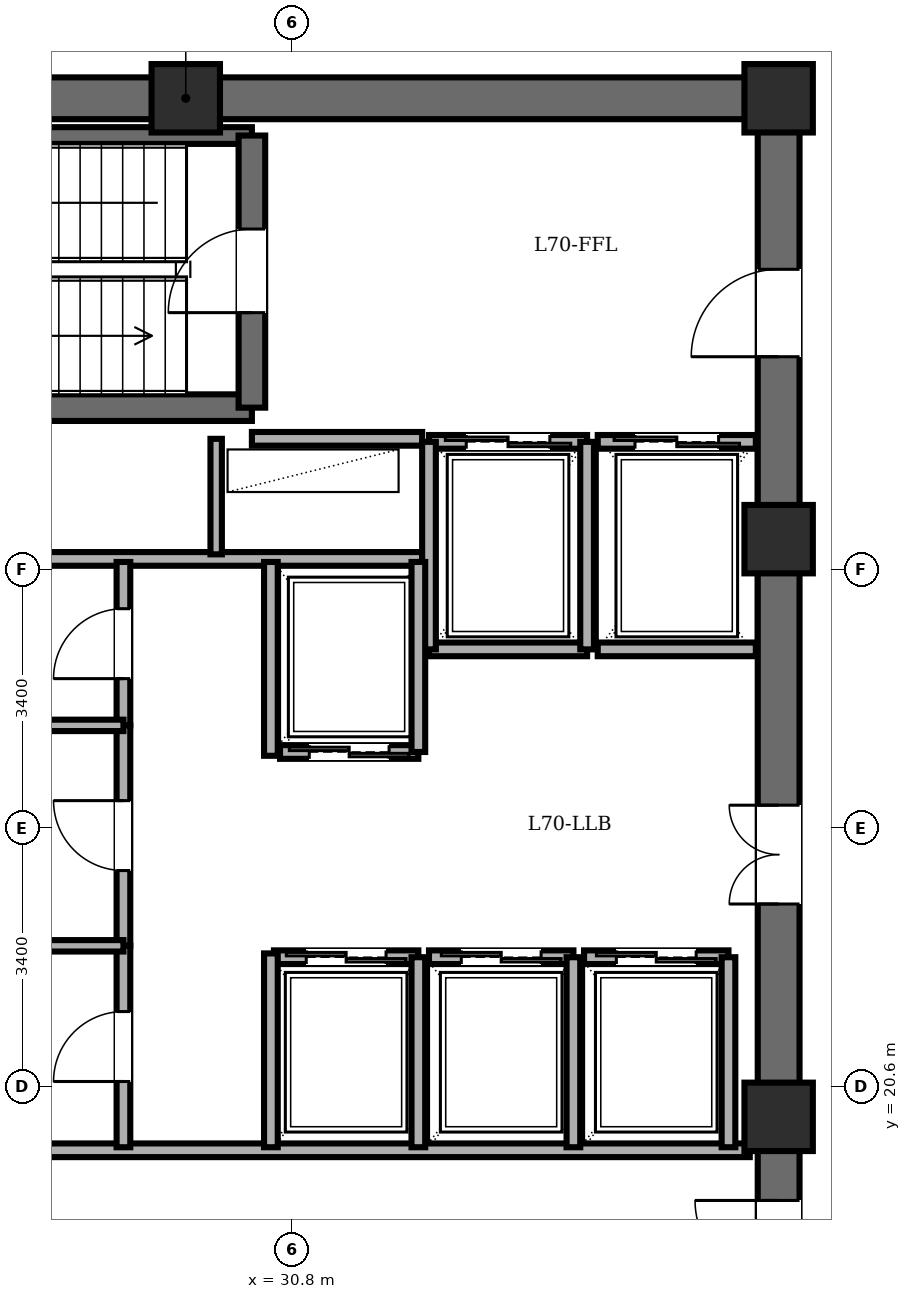
"""IFC4 building model, lengths in metres.
Left out: names, types, materials, properties, quantities, classifications, styles, units other than length and angle.
Written with IfcOpenShell. Run it as: python <this file> out.ifc"""

import sys

from ifc_helpers import new_model, si_unit, direction, frame, frame_2d, origin, origin_2d, place, context, subcontext, project, spatial, rectangle, extrude, element, fill, save


model = new_model("IFC4")
c1 = context("Model", 3, precision=1e-05, world=origin(), true_north=direction((0.0, 1.0)))
c2 = subcontext(c1, "Body", "Model", "MODEL_VIEW")
j1 = project(units=[si_unit("LENGTHUNIT", "METRE"), si_unit("PLANEANGLEUNIT", "RADIAN")], contexts=[c1])
p1 = place(None, origin())
s1 = spatial("IfcSite", under=j1, at=p1, CompositionType="ELEMENT")
p2 = place(p1, origin())
s2 = spatial("IfcBuilding", under=s1, at=p2, CompositionType="ELEMENT")
p3 = place(p2, frame((0.0, 0.0, 269.75)))
s3 = spatial("IfcBuildingStorey", under=s2, at=p3, CompositionType="ELEMENT", Elevation=269.75)
for number, where, z_axis, x_axis in (
    (1, (37.2, 20.2, 0.0), (0.0, 0.0, 1.0), (1.0, 0.0, 0.0)),
    (2, (37.2, 27.8, 0.0), (0.0, 0.0, 1.0), (1.0, 0.0, 0.0)),
    (3, (37.2, 33.6, 0.0), (0.0, 0.0, 1.0), (1.0, 0.0, 0.0)),
    (4, (29.4, 33.6, 0.0), (0.0, 0.0, 1.0), (1.0, 0.0, 0.0)),
):
    element("IfcColumn", number, at=place(p3, frame(where, z_axis=z_axis, x_axis=x_axis)), inside=s3, PredefinedType="COLUMN", context=c2, shape_type="SweptSolid", body=[
        extrude(rectangle(XDim=0.9, YDim=0.9, at=origin_2d()), origin(), (0.0, 0.0, 1.0), 3.65),
    ])
p4 = place(p3, frame((21.6, 33.6, 0.0), z_axis=(0.0, 0.0, 1.0), x_axis=(1.0, 0.0, 0.0)))
e5 = element("IfcWall", 5, at=p4, inside=s3, PredefinedType="SHEAR", context=c2, shape_type="SweptSolid", body=[
    extrude(rectangle(XDim=15.6, YDim=0.55, at=frame_2d((7.8, 0.0))), origin(), (0.0, 0.0, 1.0), 3.45),
])
p5 = place(p3, frame((37.2, 14.4, 0.0), z_axis=(0.0, 0.0, 1.0), x_axis=(0.0, 1.0, 0.0)))
e6 = element("IfcWall", 6, at=p5, inside=s3, PredefinedType="SHEAR", context=c2, shape_type="SweptSolid", body=[
    extrude(rectangle(XDim=19.2, YDim=0.55, at=frame_2d((9.6, 0.0))), origin(), (0.0, 0.0, 1.0), 3.45),
])
p6 = place(p5, frame((15.8, 0.0, 0.0)))
e7 = element("IfcOpeningElement", 7, at=p6, cuts=e6, PredefinedType="OPENING", context=c2, shape_type="SweptSolid", body=[
    extrude(rectangle(XDim=1.15, YDim=2.15, at=frame_2d((0.575, 1.075))), frame((0.0, 0.285, 0.0), z_axis=(0.0, -1.0, 0.0), x_axis=(1.0, 0.0, 0.0)), (0.0, 0.0, 1.0), 0.57),
])
p7 = place(p5, frame((3.6, 0.0, 0.0)))
e8 = element("IfcOpeningElement", 8, at=p7, cuts=e6, PredefinedType="OPENING", context=c2, shape_type="SweptSolid", body=[
    extrude(rectangle(XDim=1.1, YDim=2.15, at=frame_2d((0.55, 1.075))), frame((0.0, 0.285, 0.0), z_axis=(0.0, -1.0, 0.0), x_axis=(1.0, 0.0, 0.0)), (0.0, 0.0, 1.0), 0.57),
])
p8 = place(p5, frame((8.6, 0.0, 0.0)))
e9 = element("IfcOpeningElement", 9, at=p8, cuts=e6, PredefinedType="OPENING", context=c2, shape_type="SweptSolid", body=[
    extrude(rectangle(XDim=1.3, YDim=2.2, at=frame_2d((0.65, 1.1))), frame((0.0, 0.285, 0.0), z_axis=(0.0, -1.0, 0.0), x_axis=(1.0, 0.0, 0.0)), (0.0, 0.0, 1.0), 0.57),
])
p9 = place(p3, frame((22.48, 29.53, 0.0), z_axis=(0.0, 0.0, 1.0), x_axis=(1.0, 0.0, 0.0)))
e10 = element("IfcWall", 10, at=p9, inside=s3, PredefinedType="SOLIDWALL", context=c2, shape_type="SweptSolid", body=[
    extrude(rectangle(XDim=7.79, YDim=0.35, at=frame_2d((3.895, 0.0))), origin(), (0.0, 0.0, 1.0), 3.45),
])
p10 = place(p3, frame((22.48, 33.11, 0.0), z_axis=(0.0, 0.0, 1.0), x_axis=(1.0, 0.0, 0.0)))
e11 = element("IfcWall", 11, at=p10, inside=s3, PredefinedType="PARTITIONING", context=c2, shape_type="SweptSolid", body=[
    extrude(rectangle(XDim=7.79, YDim=0.22, at=frame_2d((3.895, 0.0))), origin(), (0.0, 0.0, 1.0), 3.45),
])
p11 = place(p3, frame((30.27, 29.53, 0.0), z_axis=(0.0, 0.0, 1.0), x_axis=(0.0, 1.0, 0.0)))
e12 = element("IfcWall", 12, at=p11, inside=s3, PredefinedType="SOLIDWALL", context=c2, shape_type="SweptSolid", body=[
    extrude(rectangle(XDim=3.58, YDim=0.35, at=frame_2d((1.79, 0.0))), origin(), (0.0, 0.0, 1.0), 3.45),
])
p12 = place(p11, frame((1.25, 0.0, 0.0)))
e13 = element("IfcOpeningElement", 13, at=p12, cuts=e12, PredefinedType="OPENING", context=c2, shape_type="SweptSolid", body=[
    extrude(rectangle(XDim=1.1, YDim=2.15, at=frame_2d((0.55, 1.075))), frame((0.0, 0.185, 0.0), z_axis=(0.0, -1.0, 0.0), x_axis=(1.0, 0.0, 0.0)), (0.0, 0.0, 1.0), 0.37),
])
p13 = place(p3, frame((30.27, 29.12, 0.0), z_axis=(0.0, 0.0, 1.0), x_axis=(1.0, 0.0, 0.0)))
e14 = element("IfcWall", 14, at=p13, inside=s3, PredefinedType="PARTITIONING", context=c2, shape_type="SweptSolid", body=[
    extrude(rectangle(XDim=2.24, YDim=0.18, at=frame_2d((1.12, 0.0))), origin(), (0.0, 0.0, 1.0), 3.45),
])
p14 = place(p3, frame((21.95, 27.54, 0.0), z_axis=(0.0, 0.0, 1.0), x_axis=(1.0, 0.0, 0.0)))
e15 = element("IfcWall", 15, at=p14, inside=s3, PredefinedType="PARTITIONING", context=c2, shape_type="SweptSolid", body=[
    extrude(rectangle(XDim=10.56, YDim=0.18, at=frame_2d((5.28, 0.0))), origin(), (0.0, 0.0, 1.0), 3.45),
])
p15 = place(p3, frame((29.8, 27.6, 0.0), z_axis=(0.0, 0.0, 1.0), x_axis=(0.0, 1.0, 0.0)))
e16 = element("IfcWall", 16, at=p15, inside=s3, PredefinedType="PARTITIONING", context=c2, shape_type="SweptSolid", body=[
    extrude(rectangle(XDim=1.52, YDim=0.15, at=frame_2d((0.76, 0.0))), origin(), (0.0, 0.0, 1.0), 3.45),
])
p16 = place(p3, frame((21.95, 19.76, 0.0), z_axis=(0.0, 0.0, 1.0), x_axis=(1.0, 0.0, 0.0)))
e17 = element("IfcWall", 17, at=p16, inside=s3, PredefinedType="PARTITIONING", context=c2, shape_type="SweptSolid", body=[
    extrude(rectangle(XDim=14.87, YDim=0.18, at=frame_2d((7.435, 0.0))), origin(), (0.0, 0.0, 1.0), 3.45),
])
p17 = place(p3, frame((32.6, 29.08, 0.0), z_axis=(0.0, 0.0, 1.0), x_axis=(1.0, 0.0, 0.0)))
e18 = element("IfcWall", 18, at=p17, inside=s3, PredefinedType="PARTITIONING", context=c2, shape_type="SweptSolid", body=[
    extrude(rectangle(XDim=2.08, YDim=0.18, at=frame_2d((1.04, 0.0))), origin(), (0.0, 0.0, 1.0), 3.45),
])
p18 = place(p17, frame((0.49, 0.0, 0.0)))
e19 = element("IfcOpeningElement", 19, at=p18, cuts=e18, PredefinedType="OPENING", context=c2, shape_type="SweptSolid", body=[
    extrude(rectangle(XDim=1.1, YDim=2.2, at=frame_2d((0.55, 1.1))), frame((0.0, 0.1, 0.0), z_axis=(0.0, -1.0, 0.0), x_axis=(1.0, 0.0, 0.0)), (0.0, 0.0, 1.0), 0.2),
])
p19 = place(p3, frame((34.68, 26.35, 0.0), z_axis=(0.0, 0.0, 1.0), x_axis=(-1.0, 0.0, 0.0)))
e20 = element("IfcWall", 20, at=p19, inside=s3, PredefinedType="PARTITIONING", context=c2, shape_type="SweptSolid", body=[
    extrude(rectangle(XDim=2.08, YDim=0.18, at=frame_2d((1.04, 0.0))), origin(), (0.0, 0.0, 1.0), 3.45),
])
for number, where, z_axis, x_axis in (
    (21, (34.68, 26.35, 0.0), (0.0, 0.0, 1.0), (0.0, 1.0, 0.0)),
    (22, (32.6, 29.08, 0.0), (0.0, 0.0, 1.0), (0.0, -1.0, 0.0)),
):
    element("IfcWall", number, at=place(p3, frame(where, z_axis=z_axis, x_axis=x_axis)), inside=s3, PredefinedType="PARTITIONING", context=c2, shape_type="SweptSolid", body=[
        extrude(rectangle(XDim=2.73, YDim=0.18, at=frame_2d((1.365, 0.0))), origin(), (0.0, 0.0, 1.0), 3.45),
    ])
p20 = place(p3, frame((34.82, 29.08, 0.0), z_axis=(0.0, 0.0, 1.0), x_axis=(1.0, 0.0, 0.0)))
e23 = element("IfcWall", 23, at=p20, inside=s3, PredefinedType="PARTITIONING", context=c2, shape_type="SweptSolid", body=[
    extrude(rectangle(XDim=2.08, YDim=0.18, at=frame_2d((1.04, 0.0))), origin(), (0.0, 0.0, 1.0), 3.45),
])
p21 = place(p20, frame((0.49, 0.0, 0.0)))
e24 = element("IfcOpeningElement", 24, at=p21, cuts=e23, PredefinedType="OPENING", context=c2, shape_type="SweptSolid", body=[
    extrude(rectangle(XDim=1.1, YDim=2.2, at=frame_2d((0.55, 1.1))), frame((0.0, 0.1, 0.0), z_axis=(0.0, -1.0, 0.0), x_axis=(1.0, 0.0, 0.0)), (0.0, 0.0, 1.0), 0.2),
])
p22 = place(p3, frame((36.9, 26.35, 0.0), z_axis=(0.0, 0.0, 1.0), x_axis=(-1.0, 0.0, 0.0)))
e25 = element("IfcWall", 25, at=p22, inside=s3, PredefinedType="PARTITIONING", context=c2, shape_type="SweptSolid", body=[
    extrude(rectangle(XDim=2.08, YDim=0.18, at=frame_2d((1.04, 0.0))), origin(), (0.0, 0.0, 1.0), 3.45),
])
p23 = place(p3, frame((32.46, 25.0, 0.0), z_axis=(0.0, 0.0, 1.0), x_axis=(-1.0, 0.0, 0.0)))
e26 = element("IfcWall", 26, at=p23, inside=s3, PredefinedType="PARTITIONING", context=c2, shape_type="SweptSolid", body=[
    extrude(rectangle(XDim=1.82, YDim=0.18, at=frame_2d((0.91, 0.0))), origin(), (0.0, 0.0, 1.0), 3.45),
])
p24 = place(p23, frame((0.385, 0.0, 0.0)))
e27 = element("IfcOpeningElement", 27, at=p24, cuts=e26, PredefinedType="OPENING", context=c2, shape_type="SweptSolid", body=[
    extrude(rectangle(XDim=1.05, YDim=2.2, at=frame_2d((0.525, 1.1))), frame((0.0, 0.1, 0.0), z_axis=(0.0, -1.0, 0.0), x_axis=(1.0, 0.0, 0.0)), (0.0, 0.0, 1.0), 0.2),
])
p25 = place(p3, frame((32.46, 25.0, 0.0), z_axis=(0.0, 0.0, 1.0), x_axis=(0.0, 1.0, 0.0)))
e28 = element("IfcWall", 28, at=p25, inside=s3, PredefinedType="PARTITIONING", context=c2, shape_type="SweptSolid", body=[
    extrude(rectangle(XDim=2.5, YDim=0.18, at=frame_2d((1.25, 0.0))), origin(), (0.0, 0.0, 1.0), 3.45),
])
p26 = place(p3, frame((30.56, 22.3, 0.0), z_axis=(0.0, 0.0, 1.0), x_axis=(1.0, 0.0, 0.0)))
e29 = element("IfcWall", 29, at=p26, inside=s3, PredefinedType="PARTITIONING", context=c2, shape_type="SweptSolid", body=[
    extrude(rectangle(XDim=1.9, YDim=0.18, at=frame_2d((0.95, 0.0))), origin(), (0.0, 0.0, 1.0), 3.45),
])
p27 = place(p26, frame((0.425, 0.0, 0.0)))
e30 = element("IfcOpeningElement", 30, at=p27, cuts=e29, PredefinedType="OPENING", context=c2, shape_type="SweptSolid", body=[
    extrude(rectangle(XDim=1.05, YDim=2.2, at=frame_2d((0.525, 1.1))), frame((0.0, 0.1, 0.0), z_axis=(0.0, -1.0, 0.0), x_axis=(1.0, 0.0, 0.0)), (0.0, 0.0, 1.0), 0.2),
])
p28 = place(p3, frame((32.46, 19.8, 0.0), z_axis=(0.0, 0.0, 1.0), x_axis=(0.0, 1.0, 0.0)))
e31 = element("IfcWall", 31, at=p28, inside=s3, PredefinedType="PARTITIONING", context=c2, shape_type="SweptSolid", body=[
    extrude(rectangle(XDim=2.5, YDim=0.18, at=frame_2d((1.25, 0.0))), origin(), (0.0, 0.0, 1.0), 3.45),
])
p29 = place(p3, frame((32.6, 22.3, 0.0), z_axis=(0.0, 0.0, 1.0), x_axis=(1.0, 0.0, 0.0)))
e32 = element("IfcWall", 32, at=p29, inside=s3, PredefinedType="PARTITIONING", context=c2, shape_type="SweptSolid", body=[
    extrude(rectangle(XDim=1.9, YDim=0.18, at=frame_2d((0.95, 0.0))), origin(), (0.0, 0.0, 1.0), 3.45),
])
p30 = place(p29, frame((0.425, 0.0, 0.0)))
e33 = element("IfcOpeningElement", 33, at=p30, cuts=e32, PredefinedType="OPENING", context=c2, shape_type="SweptSolid", body=[
    extrude(rectangle(XDim=1.05, YDim=2.2, at=frame_2d((0.525, 1.1))), frame((0.0, 0.1, 0.0), z_axis=(0.0, -1.0, 0.0), x_axis=(1.0, 0.0, 0.0)), (0.0, 0.0, 1.0), 0.2),
])
p31 = place(p3, frame((34.5, 19.8, 0.0), z_axis=(0.0, 0.0, 1.0), x_axis=(0.0, 1.0, 0.0)))
e34 = element("IfcWall", 34, at=p31, inside=s3, PredefinedType="PARTITIONING", context=c2, shape_type="SweptSolid", body=[
    extrude(rectangle(XDim=2.5, YDim=0.18, at=frame_2d((1.25, 0.0))), origin(), (0.0, 0.0, 1.0), 3.45),
])
p32 = place(p3, frame((34.64, 22.3, 0.0), z_axis=(0.0, 0.0, 1.0), x_axis=(1.0, 0.0, 0.0)))
e35 = element("IfcWall", 35, at=p32, inside=s3, PredefinedType="PARTITIONING", context=c2, shape_type="SweptSolid", body=[
    extrude(rectangle(XDim=1.9, YDim=0.18, at=frame_2d((0.95, 0.0))), origin(), (0.0, 0.0, 1.0), 3.45),
])
p33 = place(p32, frame((0.425, 0.0, 0.0)))
e36 = element("IfcOpeningElement", 36, at=p33, cuts=e35, PredefinedType="OPENING", context=c2, shape_type="SweptSolid", body=[
    extrude(rectangle(XDim=1.05, YDim=2.2, at=frame_2d((0.525, 1.1))), frame((0.0, 0.1, 0.0), z_axis=(0.0, -1.0, 0.0), x_axis=(1.0, 0.0, 0.0)), (0.0, 0.0, 1.0), 0.2),
])
p34 = place(p3, frame((36.54, 19.8, 0.0), z_axis=(0.0, 0.0, 1.0), x_axis=(0.0, 1.0, 0.0)))
e37 = element("IfcWall", 37, at=p34, inside=s3, PredefinedType="PARTITIONING", context=c2, shape_type="SweptSolid", body=[
    extrude(rectangle(XDim=2.5, YDim=0.18, at=frame_2d((1.25, 0.0))), origin(), (0.0, 0.0, 1.0), 3.45),
])
for number, where, z_axis, x_axis in (
    (38, (30.52, 24.95, 0.0), (0.0, 0.0, 1.0), (0.0, 1.0, 0.0)),
    (39, (30.52, 19.8, 0.0), (0.0, 0.0, 1.0), (0.0, 1.0, 0.0)),
):
    element("IfcWall", number, at=place(p3, frame(where, z_axis=z_axis, x_axis=x_axis)), inside=s3, PredefinedType="PARTITIONING", context=c2, shape_type="SweptSolid", body=[
        extrude(rectangle(XDim=2.55, YDim=0.18, at=frame_2d((1.275, 0.0))), origin(), (0.0, 0.0, 1.0), 3.45),
    ])
p35 = place(p3, frame((28.58, 25.35, 0.0), z_axis=(0.0, 0.0, 1.0), x_axis=(0.0, 1.0, 0.0)))
e40 = element("IfcWall", 40, at=p35, inside=s3, PredefinedType="PARTITIONING", context=c2, shape_type="SweptSolid", body=[
    extrude(rectangle(XDim=2.15, YDim=0.18, at=frame_2d((1.075, 0.0))), origin(), (0.0, 0.0, 1.0), 3.45),
])
p36 = place(p35, frame((0.615, 0.0, 0.0)))
e41 = element("IfcOpeningElement", 41, at=p36, cuts=e40, PredefinedType="OPENING", context=c2, shape_type="SweptSolid", body=[
    extrude(rectangle(XDim=0.92, YDim=2.1, at=frame_2d((0.46, 1.05))), frame((0.0, 0.1, 0.0), z_axis=(0.0, -1.0, 0.0), x_axis=(1.0, 0.0, 0.0)), (0.0, 0.0, 1.0), 0.2),
])
p37 = place(p3, frame((28.58, 22.45, 0.0), z_axis=(0.0, 0.0, 1.0), x_axis=(0.0, 1.0, 0.0)))
e42 = element("IfcWall", 42, at=p37, inside=s3, PredefinedType="PARTITIONING", context=c2, shape_type="SweptSolid", body=[
    extrude(rectangle(XDim=2.9, YDim=0.18, at=frame_2d((1.45, 0.0))), origin(), (0.0, 0.0, 1.0), 3.45),
])
p38 = place(p37, frame((0.99, 0.0, 0.0)))
e43 = element("IfcOpeningElement", 43, at=p38, cuts=e42, PredefinedType="OPENING", context=c2, shape_type="SweptSolid", body=[
    extrude(rectangle(XDim=0.92, YDim=2.1, at=frame_2d((0.46, 1.05))), frame((0.0, 0.1, 0.0), z_axis=(0.0, -1.0, 0.0), x_axis=(1.0, 0.0, 0.0)), (0.0, 0.0, 1.0), 0.2),
])
p39 = place(p3, frame((28.58, 19.8, 0.0), z_axis=(0.0, 0.0, 1.0), x_axis=(0.0, 1.0, 0.0)))
e44 = element("IfcWall", 44, at=p39, inside=s3, PredefinedType="PARTITIONING", context=c2, shape_type="SweptSolid", body=[
    extrude(rectangle(XDim=2.65, YDim=0.18, at=frame_2d((1.325, 0.0))), origin(), (0.0, 0.0, 1.0), 3.45),
])
p40 = place(p39, frame((0.865, 0.0, 0.0)))
e45 = element("IfcOpeningElement", 45, at=p40, cuts=e44, PredefinedType="OPENING", context=c2, shape_type="SweptSolid", body=[
    extrude(rectangle(XDim=0.92, YDim=2.1, at=frame_2d((0.46, 1.05))), frame((0.0, 0.1, 0.0), z_axis=(0.0, -1.0, 0.0), x_axis=(1.0, 0.0, 0.0)), (0.0, 0.0, 1.0), 0.2),
])
for number, where, z_axis, x_axis in (
    (46, (21.95, 25.35, 0.0), (0.0, 0.0, 1.0), (1.0, 0.0, 0.0)),
    (47, (21.95, 22.45, 0.0), (0.0, 0.0, 1.0), (1.0, 0.0, 0.0)),
):
    element("IfcWall", number, at=place(p3, frame(where, z_axis=z_axis, x_axis=x_axis)), inside=s3, PredefinedType="PARTITIONING", context=c2, shape_type="SweptSolid", body=[
        extrude(rectangle(XDim=6.63, YDim=0.15, at=frame_2d((3.315, 0.0))), origin(), (0.0, 0.0, 1.0), 3.45),
    ])
p41 = place(p12, origin())
e48 = element("IfcDoor", 48, at=p41, inside=s3, OperationType="SINGLE_SWING_LEFT", PredefinedType="DOOR", context=c2, shape_type="SweptSolid", body=[
    extrude(rectangle(XDim=1.1, YDim=2.15, at=frame_2d((0.55, 1.075))), frame((0.0, 0.025, 0.0), z_axis=(0.0, -1.0, 0.0), x_axis=(1.0, 0.0, 0.0)), (0.0, 0.0, 1.0), 0.05),
])
fill(e13, e48)
p42 = place(p6, origin())
e49 = element("IfcDoor", 49, at=p42, inside=s3, OperationType="SINGLE_SWING_LEFT", PredefinedType="DOOR", context=c2, shape_type="SweptSolid", body=[
    extrude(rectangle(XDim=1.15, YDim=2.15, at=frame_2d((0.575, 1.075))), frame((0.0, 0.025, 0.0), z_axis=(0.0, -1.0, 0.0), x_axis=(1.0, 0.0, 0.0)), (0.0, 0.0, 1.0), 0.05),
])
fill(e7, e49)
p43 = place(p7, origin())
e50 = element("IfcDoor", 50, at=p43, inside=s3, OperationType="SINGLE_SWING_RIGHT", PredefinedType="DOOR", context=c2, shape_type="SweptSolid", body=[
    extrude(rectangle(XDim=1.1, YDim=2.15, at=frame_2d((0.55, 1.075))), frame((0.0, 0.025, 0.0), z_axis=(0.0, -1.0, 0.0), x_axis=(1.0, 0.0, 0.0)), (0.0, 0.0, 1.0), 0.05),
])
fill(e8, e50)
p44 = place(p18, origin())
e51 = element("IfcDoor", 51, at=p44, inside=s3, OperationType="DOUBLE_DOOR_SLIDING", PredefinedType="DOOR", context=c2, shape_type="SweptSolid", body=[
    extrude(rectangle(XDim=1.1, YDim=2.2, at=frame_2d((0.55, 1.1))), frame((0.0, 0.025, 0.0), z_axis=(0.0, -1.0, 0.0), x_axis=(1.0, 0.0, 0.0)), (0.0, 0.0, 1.0), 0.05),
])
fill(e19, e51)
p45 = place(p21, origin())
e52 = element("IfcDoor", 52, at=p45, inside=s3, OperationType="DOUBLE_DOOR_SLIDING", PredefinedType="DOOR", context=c2, shape_type="SweptSolid", body=[
    extrude(rectangle(XDim=1.1, YDim=2.2, at=frame_2d((0.55, 1.1))), frame((0.0, 0.025, 0.0), z_axis=(0.0, -1.0, 0.0), x_axis=(1.0, 0.0, 0.0)), (0.0, 0.0, 1.0), 0.05),
])
fill(e24, e52)
p46 = place(p24, origin())
e53 = element("IfcDoor", 53, at=p46, inside=s3, OperationType="DOUBLE_DOOR_SLIDING", PredefinedType="DOOR", context=c2, shape_type="SweptSolid", body=[
    extrude(rectangle(XDim=1.05, YDim=2.2, at=frame_2d((0.525, 1.1))), frame((0.0, 0.025, 0.0), z_axis=(0.0, -1.0, 0.0), x_axis=(1.0, 0.0, 0.0)), (0.0, 0.0, 1.0), 0.05),
])
fill(e27, e53)
p47 = place(p27, origin())
e54 = element("IfcDoor", 54, at=p47, inside=s3, OperationType="DOUBLE_DOOR_SLIDING", PredefinedType="DOOR", context=c2, shape_type="SweptSolid", body=[
    extrude(rectangle(XDim=1.05, YDim=2.2, at=frame_2d((0.525, 1.1))), frame((0.0, 0.025, 0.0), z_axis=(0.0, -1.0, 0.0), x_axis=(1.0, 0.0, 0.0)), (0.0, 0.0, 1.0), 0.05),
])
fill(e30, e54)
p48 = place(p30, origin())
e55 = element("IfcDoor", 55, at=p48, inside=s3, OperationType="DOUBLE_DOOR_SLIDING", PredefinedType="DOOR", context=c2, shape_type="SweptSolid", body=[
    extrude(rectangle(XDim=1.05, YDim=2.2, at=frame_2d((0.525, 1.1))), frame((0.0, 0.025, 0.0), z_axis=(0.0, -1.0, 0.0), x_axis=(1.0, 0.0, 0.0)), (0.0, 0.0, 1.0), 0.05),
])
fill(e33, e55)
p49 = place(p33, origin())
e56 = element("IfcDoor", 56, at=p49, inside=s3, OperationType="DOUBLE_DOOR_SLIDING", PredefinedType="DOOR", context=c2, shape_type="SweptSolid", body=[
    extrude(rectangle(XDim=1.05, YDim=2.2, at=frame_2d((0.525, 1.1))), frame((0.0, 0.025, 0.0), z_axis=(0.0, -1.0, 0.0), x_axis=(1.0, 0.0, 0.0)), (0.0, 0.0, 1.0), 0.05),
])
fill(e36, e56)
p50 = place(p36, origin())
e57 = element("IfcDoor", 57, at=p50, inside=s3, OperationType="SINGLE_SWING_LEFT", PredefinedType="DOOR", context=c2, shape_type="SweptSolid", body=[
    extrude(rectangle(XDim=0.92, YDim=2.1, at=frame_2d((0.46, 1.05))), frame((0.0, 0.025, 0.0), z_axis=(0.0, -1.0, 0.0), x_axis=(1.0, 0.0, 0.0)), (0.0, 0.0, 1.0), 0.05),
])
fill(e41, e57)
p51 = place(p38, origin())
e58 = element("IfcDoor", 58, at=p51, inside=s3, OperationType="SINGLE_SWING_RIGHT", PredefinedType="DOOR", context=c2, shape_type="SweptSolid", body=[
    extrude(rectangle(XDim=0.92, YDim=2.1, at=frame_2d((0.46, 1.05))), frame((0.0, 0.025, 0.0), z_axis=(0.0, -1.0, 0.0), x_axis=(1.0, 0.0, 0.0)), (0.0, 0.0, 1.0), 0.05),
])
fill(e43, e58)
p52 = place(p40, origin())
e59 = element("IfcDoor", 59, at=p52, inside=s3, OperationType="SINGLE_SWING_LEFT", PredefinedType="DOOR", context=c2, shape_type="SweptSolid", body=[
    extrude(rectangle(XDim=0.92, YDim=2.1, at=frame_2d((0.46, 1.05))), frame((0.0, 0.025, 0.0), z_axis=(0.0, -1.0, 0.0), x_axis=(1.0, 0.0, 0.0)), (0.0, 0.0, 1.0), 0.05),
])
fill(e45, e59)
p53 = place(p8, origin())
e60 = element("IfcDoor", 60, at=p53, inside=s3, OperationType="DOUBLE_DOOR_SINGLE_SWING", PredefinedType="DOOR", context=c2, shape_type="SweptSolid", body=[
    extrude(rectangle(XDim=1.3, YDim=2.2, at=frame_2d((0.65, 1.1))), frame((0.0, 0.025, 0.0), z_axis=(0.0, -1.0, 0.0), x_axis=(1.0, 0.0, 0.0)), (0.0, 0.0, 1.0), 0.05),
])
fill(e9, e60)
save(model, sys.argv[1])
